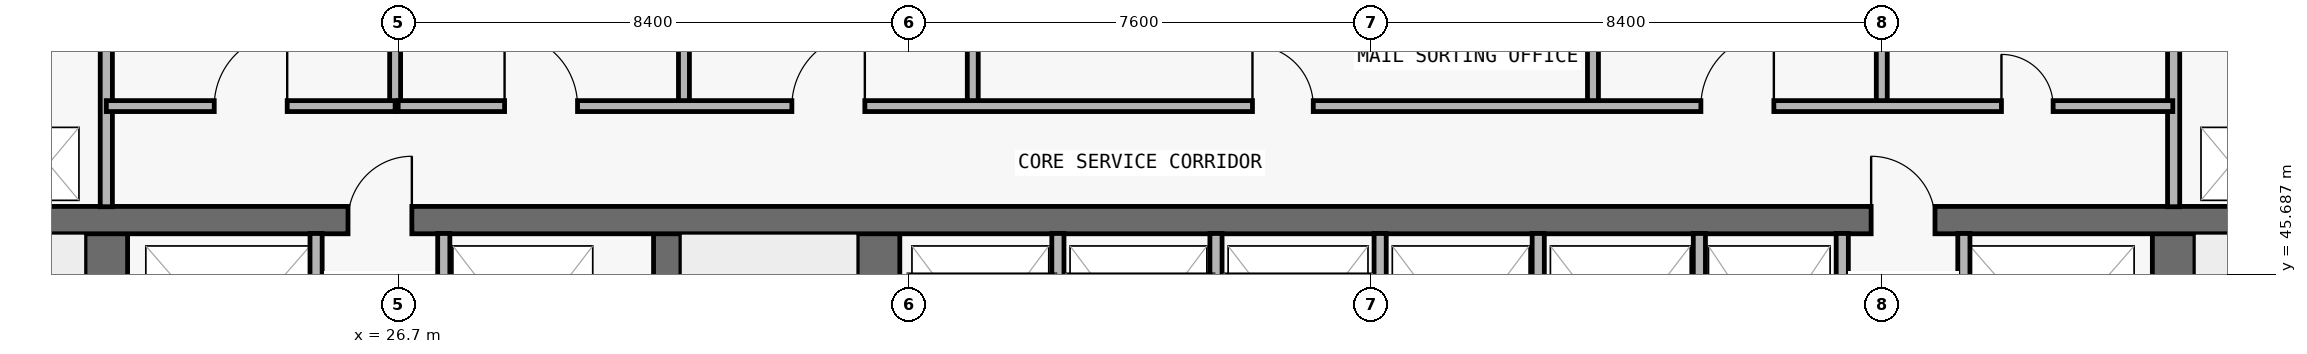
"""IFC4 building model, lengths in metres.
Left out: names, types, materials, properties, quantities, classifications, styles, units other than length and angle.
Written with IfcOpenShell. Run it as: python <this file> out.ifc"""

import sys

from ifc_helpers import new_model, si_unit, direction, frame, frame_2d, origin, place, context, subcontext, project, spatial, rectangle, extrude, element, fill, save


model = new_model("IFC4")
c1 = context("Model", 3, precision=1e-05, world=origin(), true_north=direction((0.0, 1.0)))
c2 = subcontext(c1, "Body", "Model", "MODEL_VIEW")
j1 = project(units=[si_unit("LENGTHUNIT", "METRE"), si_unit("PLANEANGLEUNIT", "RADIAN")], contexts=[c1])
p1 = place(None, origin())
s1 = spatial("IfcSite", under=j1, at=p1, CompositionType="ELEMENT")
p2 = place(p1, origin())
s2 = spatial("IfcBuilding", under=s1, at=p2, CompositionType="ELEMENT")
p3 = place(p2, frame((0.0, 0.0, 84.6)))
s3 = spatial("IfcBuildingStorey", under=s2, at=p3, CompositionType="ELEMENT", Elevation=84.6)
p4 = place(p3, frame((21.9, 36.95, 0.0), z_axis=(0.0, 0.0, 1.0), x_axis=(0.0, 1.0, 0.0)))
e1 = element("IfcWall", 1, at=p4, inside=s3, PredefinedType="SHEAR", context=c2, shape_type="SweptSolid", body=[
    extrude(rectangle(XDim=9.625, YDim=0.7, at=frame_2d((4.812, 0.0))), origin(), (0.0, 0.0, 1.0), 3.05),
])
p5 = place(p4, frame((0.6, 0.0, 0.0)))
e2 = element("IfcOpeningElement", 2, at=p5, cuts=e1, PredefinedType="OPENING", context=c2, shape_type="SweptSolid", body=[
    extrude(rectangle(XDim=1.1, YDim=2.15, at=frame_2d((0.55, 1.075))), frame((0.0, 0.36, 0.0), z_axis=(0.0, -1.0, 0.0), x_axis=(1.0, 0.0, 0.0)), (0.0, 0.0, 1.0), 0.72),
])
p6 = place(p3, frame((55.9, 36.95, 0.0), z_axis=(0.0, 0.0, 1.0), x_axis=(0.0, 1.0, 0.0)))
e3 = element("IfcWall", 3, at=p6, inside=s3, PredefinedType="SHEAR", context=c2, shape_type="SweptSolid", body=[
    extrude(rectangle(XDim=9.625, YDim=0.7, at=frame_2d((4.812, 0.0))), origin(), (0.0, 0.0, 1.0), 3.05),
])
p7 = place(p6, frame((0.6, 0.0, 0.0)))
e4 = element("IfcOpeningElement", 4, at=p7, cuts=e3, PredefinedType="OPENING", context=c2, shape_type="SweptSolid", body=[
    extrude(rectangle(XDim=1.1, YDim=2.15, at=frame_2d((0.55, 1.075))), frame((0.0, 0.36, 0.0), z_axis=(0.0, -1.0, 0.0), x_axis=(1.0, 0.0, 0.0)), (0.0, 0.0, 1.0), 0.72),
])
p8 = place(p3, frame((31.125, 36.95, 0.0), z_axis=(0.0, 0.0, 1.0), x_axis=(0.0, 1.0, 0.0)))
e5 = element("IfcWall", 5, at=p8, inside=s3, PredefinedType="SHEAR", context=c2, shape_type="SweptSolid", body=[
    extrude(rectangle(XDim=9.625, YDim=0.45, at=frame_2d((4.812, 0.0))), origin(), (0.0, 0.0, 1.0), 3.05),
])
p9 = place(p3, frame((34.6, 36.95, 0.0), z_axis=(0.0, 0.0, 1.0), x_axis=(0.0, 1.0, 0.0)))
e6 = element("IfcWall", 6, at=p9, inside=s3, PredefinedType="SHEAR", context=c2, shape_type="SweptSolid", body=[
    extrude(rectangle(XDim=9.625, YDim=0.7, at=frame_2d((4.812, 0.0))), origin(), (0.0, 0.0, 1.0), 3.05),
])
p10 = place(p3, frame((18.25, 46.575, 0.0), z_axis=(0.0, 0.0, 1.0), x_axis=(1.0, 0.0, 0.0)))
e7 = element("IfcWall", 7, at=p10, inside=s3, PredefinedType="SHEAR", context=c2, shape_type="SweptSolid", body=[
    extrude(rectangle(XDim=41.3, YDim=0.45, at=frame_2d((20.65, 0.0))), origin(), (0.0, 0.0, 1.0), 3.05),
])
p11 = place(p10, frame((7.625, 0.0, 0.0)))
e8 = element("IfcOpeningElement", 8, at=p11, cuts=e7, PredefinedType="OPENING", context=c2, shape_type="SweptSolid", body=[
    extrude(rectangle(XDim=1.05, YDim=2.15, at=frame_2d((0.525, 1.075))), frame((0.0, 0.235, 0.0), z_axis=(0.0, -1.0, 0.0), x_axis=(1.0, 0.0, 0.0)), (0.0, 0.0, 1.0), 0.47),
])
p12 = place(p10, frame((32.675, 0.0, 0.0)))
e9 = element("IfcOpeningElement", 9, at=p12, cuts=e7, PredefinedType="OPENING", context=c2, shape_type="SweptSolid", body=[
    extrude(rectangle(XDim=1.05, YDim=2.15, at=frame_2d((0.525, 1.075))), frame((0.0, 0.235, 0.0), z_axis=(0.0, -1.0, 0.0), x_axis=(1.0, 0.0, 0.0)), (0.0, 0.0, 1.0), 0.47),
])
p13 = place(p3, frame((21.9, 46.795, 0.0), z_axis=(0.0, 0.0, 1.0), x_axis=(0.0, 1.0, 0.0)))
e10 = element("IfcWall", 10, at=p13, inside=s3, PredefinedType="PARTITIONING", context=c2, shape_type="SweptSolid", body=[
    extrude(rectangle(XDim=3.06, YDim=0.2, at=frame_2d((1.53, 0.0))), origin(), (0.0, 0.0, 1.0), 3.05),
])
p14 = place(p3, frame((25.35, 43.17, 0.0), z_axis=(0.0, 0.0, 1.0), x_axis=(0.0, 1.0, 0.0)))
e11 = element("IfcWall", 11, at=p14, inside=s3, PredefinedType="PARTITIONING", context=c2, shape_type="SweptSolid", body=[
    extrude(rectangle(XDim=3.185, YDim=0.2, at=frame_2d((1.593, 0.0))), origin(), (0.0, 0.0, 1.0), 3.05),
])
p15 = place(p3, frame((26.65, 48.45, 0.0), z_axis=(0.0, 0.0, 1.0), x_axis=(0.0, 1.0, 0.0)))
e12 = element("IfcWall", 12, at=p15, inside=s3, PredefinedType="PARTITIONING", context=c2, shape_type="SweptSolid", body=[
    extrude(rectangle(XDim=1.405, YDim=0.18, at=frame_2d((0.703, 0.0))), origin(), (0.0, 0.0, 1.0), 3.05),
])
p16 = place(p3, frame((27.45, 43.17, 0.0), z_axis=(0.0, 0.0, 1.0), x_axis=(0.0, 1.0, 0.0)))
e13 = element("IfcWall", 13, at=p16, inside=s3, PredefinedType="PARTITIONING", context=c2, shape_type="SweptSolid", body=[
    extrude(rectangle(XDim=3.185, YDim=0.2, at=frame_2d((1.593, 0.0))), origin(), (0.0, 0.0, 1.0), 3.05),
])
for number, where, z_axis, x_axis in (
    (14, (31.4, 48.45, 0.0), (0.0, 0.0, 1.0), (0.0, 1.0, 0.0)),
    (15, (36.15, 48.45, 0.0), (0.0, 0.0, 1.0), (0.0, 1.0, 0.0)),
):
    element("IfcWall", number, at=place(p3, frame(where, z_axis=z_axis, x_axis=x_axis)), inside=s3, PredefinedType="PARTITIONING", context=c2, shape_type="SweptSolid", body=[
        extrude(rectangle(XDim=1.405, YDim=0.18, at=frame_2d((0.703, 0.0))), origin(), (0.0, 0.0, 1.0), 3.05),
    ])
for number, where, z_axis, x_axis in (
    (16, (37.55, 43.17, 0.0), (0.0, 0.0, 1.0), (0.0, 1.0, 0.0)),
    (17, (40.15, 43.17, 0.0), (0.0, 0.0, 1.0), (0.0, 1.0, 0.0)),
    (18, (42.85, 43.17, 0.0), (0.0, 0.0, 1.0), (0.0, 1.0, 0.0)),
    (19, (45.45, 43.17, 0.0), (0.0, 0.0, 1.0), (0.0, 1.0, 0.0)),
):
    element("IfcWall", number, at=place(p3, frame(where, z_axis=z_axis, x_axis=x_axis)), inside=s3, PredefinedType="PARTITIONING", context=c2, shape_type="SweptSolid", body=[
        extrude(rectangle(XDim=3.185, YDim=0.2, at=frame_2d((1.593, 0.0))), origin(), (0.0, 0.0, 1.0), 3.05),
    ])
p17 = place(p3, frame((46.35, 48.45, 0.0), z_axis=(0.0, 0.0, 1.0), x_axis=(0.0, 1.0, 0.0)))
e20 = element("IfcWall", 20, at=p17, inside=s3, PredefinedType="PARTITIONING", context=c2, shape_type="SweptSolid", body=[
    extrude(rectangle(XDim=1.405, YDim=0.18, at=frame_2d((0.703, 0.0))), origin(), (0.0, 0.0, 1.0), 3.05),
])
for number, where, z_axis, x_axis in (
    (21, (48.1, 43.17, 0.0), (0.0, 0.0, 1.0), (0.0, 1.0, 0.0)),
    (22, (50.45, 43.17, 0.0), (0.0, 0.0, 1.0), (0.0, 1.0, 0.0)),
):
    element("IfcWall", number, at=place(p3, frame(where, z_axis=z_axis, x_axis=x_axis)), inside=s3, PredefinedType="PARTITIONING", context=c2, shape_type="SweptSolid", body=[
        extrude(rectangle(XDim=3.185, YDim=0.2, at=frame_2d((1.593, 0.0))), origin(), (0.0, 0.0, 1.0), 3.05),
    ])
p18 = place(p3, frame((51.1, 48.45, 0.0), z_axis=(0.0, 0.0, 1.0), x_axis=(0.0, 1.0, 0.0)))
e23 = element("IfcWall", 23, at=p18, inside=s3, PredefinedType="PARTITIONING", context=c2, shape_type="SweptSolid", body=[
    extrude(rectangle(XDim=1.405, YDim=0.18, at=frame_2d((0.703, 0.0))), origin(), (0.0, 0.0, 1.0), 3.05),
])
p19 = place(p3, frame((52.45, 43.17, 0.0), z_axis=(0.0, 0.0, 1.0), x_axis=(0.0, 1.0, 0.0)))
e24 = element("IfcWall", 24, at=p19, inside=s3, PredefinedType="PARTITIONING", context=c2, shape_type="SweptSolid", body=[
    extrude(rectangle(XDim=3.185, YDim=0.2, at=frame_2d((1.593, 0.0))), origin(), (0.0, 0.0, 1.0), 3.05),
])
p20 = place(p3, frame((55.9, 46.795, 0.0), z_axis=(0.0, 0.0, 1.0), x_axis=(0.0, 1.0, 0.0)))
e25 = element("IfcWall", 25, at=p20, inside=s3, PredefinedType="PARTITIONING", context=c2, shape_type="SweptSolid", body=[
    extrude(rectangle(XDim=3.06, YDim=0.2, at=frame_2d((1.53, 0.0))), origin(), (0.0, 0.0, 1.0), 3.05),
])
p21 = place(p3, frame((21.9, 48.45, 0.0), z_axis=(0.0, 0.0, 1.0), x_axis=(1.0, 0.0, 0.0)))
e26 = element("IfcWall", 26, at=p21, inside=s3, PredefinedType="PARTITIONING", context=c2, shape_type="SweptSolid", body=[
    extrude(rectangle(XDim=4.75, YDim=0.18, at=frame_2d((2.375, 0.0))), origin(), (0.0, 0.0, 1.0), 3.05),
])
p22 = place(p21, frame((1.775, 0.0, 0.0)))
e27 = element("IfcOpeningElement", 27, at=p22, cuts=e26, PredefinedType="OPENING", context=c2, shape_type="SweptSolid", body=[
    extrude(rectangle(XDim=1.2, YDim=2.2, at=frame_2d((0.6, 1.1))), frame((0.0, 0.1, 0.0), z_axis=(0.0, -1.0, 0.0), x_axis=(1.0, 0.0, 0.0)), (0.0, 0.0, 1.0), 0.2),
])
p23 = place(p3, frame((26.7, 48.45, 0.0), z_axis=(0.0, 0.0, 1.0), x_axis=(1.0, 0.0, 0.0)))
e28 = element("IfcWall", 28, at=p23, inside=s3, PredefinedType="PARTITIONING", context=c2, shape_type="SweptSolid", body=[
    extrude(rectangle(XDim=29.186, YDim=0.18, at=frame_2d((14.593, 0.0))), origin(), (0.0, 0.0, 1.0), 3.05),
])
p24 = place(p23, frame((1.75, 0.0, 0.0)))
e29 = element("IfcOpeningElement", 29, at=p24, cuts=e28, PredefinedType="OPENING", context=c2, shape_type="SweptSolid", body=[
    extrude(rectangle(XDim=1.2, YDim=2.2, at=frame_2d((0.6, 1.1))), frame((0.0, 0.1, 0.0), z_axis=(0.0, -1.0, 0.0), x_axis=(1.0, 0.0, 0.0)), (0.0, 0.0, 1.0), 0.2),
])
p25 = place(p23, frame((6.475, 0.0, 0.0)))
e30 = element("IfcOpeningElement", 30, at=p25, cuts=e28, PredefinedType="OPENING", context=c2, shape_type="SweptSolid", body=[
    extrude(rectangle(XDim=1.2, YDim=2.2, at=frame_2d((0.6, 1.1))), frame((0.0, 0.1, 0.0), z_axis=(0.0, -1.0, 0.0), x_axis=(1.0, 0.0, 0.0)), (0.0, 0.0, 1.0), 0.2),
])
p26 = place(p23, frame((14.05, 0.0, 0.0)))
e31 = element("IfcOpeningElement", 31, at=p26, cuts=e28, PredefinedType="OPENING", context=c2, shape_type="SweptSolid", body=[
    extrude(rectangle(XDim=1.0, YDim=2.2, at=frame_2d((0.5, 1.1))), frame((0.0, 0.1, 0.0), z_axis=(0.0, -1.0, 0.0), x_axis=(1.0, 0.0, 0.0)), (0.0, 0.0, 1.0), 0.2),
])
p27 = place(p23, frame((21.425, 0.0, 0.0)))
e32 = element("IfcOpeningElement", 32, at=p27, cuts=e28, PredefinedType="OPENING", context=c2, shape_type="SweptSolid", body=[
    extrude(rectangle(XDim=1.2, YDim=2.2, at=frame_2d((0.6, 1.1))), frame((0.0, 0.1, 0.0), z_axis=(0.0, -1.0, 0.0), x_axis=(1.0, 0.0, 0.0)), (0.0, 0.0, 1.0), 0.2),
])
p28 = place(p23, frame((26.368, 0.0, 0.0)))
e33 = element("IfcOpeningElement", 33, at=p28, cuts=e28, PredefinedType="OPENING", context=c2, shape_type="SweptSolid", body=[
    extrude(rectangle(XDim=0.85, YDim=2.1, at=frame_2d((0.425, 1.05))), frame((0.0, 0.1, 0.0), z_axis=(0.0, -1.0, 0.0), x_axis=(1.0, 0.0, 0.0)), (0.0, 0.0, 1.0), 0.2),
])
p29 = place(p11, origin())
e34 = element("IfcDoor", 34, at=p29, inside=s3, OperationType="SINGLE_SWING_RIGHT", PredefinedType="DOOR", context=c2, shape_type="SweptSolid", body=[
    extrude(rectangle(XDim=1.05, YDim=2.15, at=frame_2d((0.525, 1.075))), frame((0.0, 0.025, 0.0), z_axis=(0.0, -1.0, 0.0), x_axis=(1.0, 0.0, 0.0)), (0.0, 0.0, 1.0), 0.05),
])
fill(e8, e34)
p30 = place(p12, origin())
e35 = element("IfcDoor", 35, at=p30, inside=s3, OperationType="SINGLE_SWING_LEFT", PredefinedType="DOOR", context=c2, shape_type="SweptSolid", body=[
    extrude(rectangle(XDim=1.05, YDim=2.15, at=frame_2d((0.525, 1.075))), frame((0.0, 0.025, 0.0), z_axis=(0.0, -1.0, 0.0), x_axis=(1.0, 0.0, 0.0)), (0.0, 0.0, 1.0), 0.05),
])
fill(e9, e35)
p31 = place(p22, origin())
e36 = element("IfcDoor", 36, at=p31, inside=s3, OperationType="SINGLE_SWING_RIGHT", PredefinedType="DOOR", context=c2, shape_type="SweptSolid", body=[
    extrude(rectangle(XDim=1.2, YDim=2.2, at=frame_2d((0.6, 1.1))), frame((0.0, 0.025, 0.0), z_axis=(0.0, -1.0, 0.0), x_axis=(1.0, 0.0, 0.0)), (0.0, 0.0, 1.0), 0.05),
])
fill(e27, e36)
p32 = place(p24, origin())
e37 = element("IfcDoor", 37, at=p32, inside=s3, OperationType="SINGLE_SWING_LEFT", PredefinedType="DOOR", context=c2, shape_type="SweptSolid", body=[
    extrude(rectangle(XDim=1.2, YDim=2.2, at=frame_2d((0.6, 1.1))), frame((0.0, 0.025, 0.0), z_axis=(0.0, -1.0, 0.0), x_axis=(1.0, 0.0, 0.0)), (0.0, 0.0, 1.0), 0.05),
])
fill(e29, e37)
p33 = place(p25, origin())
e38 = element("IfcDoor", 38, at=p33, inside=s3, OperationType="SINGLE_SWING_RIGHT", PredefinedType="DOOR", context=c2, shape_type="SweptSolid", body=[
    extrude(rectangle(XDim=1.2, YDim=2.2, at=frame_2d((0.6, 1.1))), frame((0.0, 0.025, 0.0), z_axis=(0.0, -1.0, 0.0), x_axis=(1.0, 0.0, 0.0)), (0.0, 0.0, 1.0), 0.05),
])
fill(e30, e38)
p34 = place(p26, origin())
e39 = element("IfcDoor", 39, at=p34, inside=s3, OperationType="SINGLE_SWING_LEFT", PredefinedType="DOOR", context=c2, shape_type="SweptSolid", body=[
    extrude(rectangle(XDim=1.0, YDim=2.2, at=frame_2d((0.5, 1.1))), frame((0.0, 0.025, 0.0), z_axis=(0.0, -1.0, 0.0), x_axis=(1.0, 0.0, 0.0)), (0.0, 0.0, 1.0), 0.05),
])
fill(e31, e39)
p35 = place(p27, origin())
e40 = element("IfcDoor", 40, at=p35, inside=s3, OperationType="SINGLE_SWING_RIGHT", PredefinedType="DOOR", context=c2, shape_type="SweptSolid", body=[
    extrude(rectangle(XDim=1.2, YDim=2.2, at=frame_2d((0.6, 1.1))), frame((0.0, 0.025, 0.0), z_axis=(0.0, -1.0, 0.0), x_axis=(1.0, 0.0, 0.0)), (0.0, 0.0, 1.0), 0.05),
])
fill(e32, e40)
p36 = place(p28, origin())
e41 = element("IfcDoor", 41, at=p36, inside=s3, OperationType="SINGLE_SWING_LEFT", PredefinedType="DOOR", context=c2, shape_type="SweptSolid", body=[
    extrude(rectangle(XDim=0.85, YDim=2.1, at=frame_2d((0.425, 1.05))), frame((0.0, 0.025, 0.0), z_axis=(0.0, -1.0, 0.0), x_axis=(1.0, 0.0, 0.0)), (0.0, 0.0, 1.0), 0.05),
])
fill(e33, e41)
save(model, sys.argv[1])
